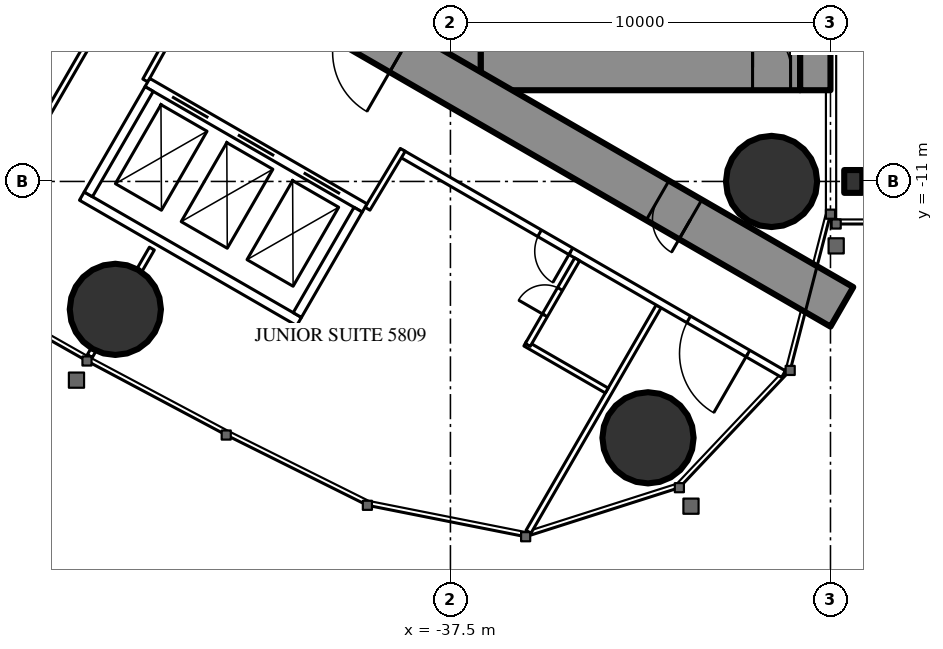
"""IFC4 building model, lengths in metres.
Left out: names, types, materials, properties, quantities, classifications, styles, units other than length and angle.
Written with IfcOpenShell. Run it as: python <this file> out.ifc"""

import sys

from ifc_helpers import new_model, si_unit, direction, frame, frame_2d, origin, origin_2d, place, context, subcontext, project, spatial, rectangle, circle, i_section, extrude, element, fill, save


model = new_model("IFC4")
c1 = context("Model", 3, precision=1e-05, world=origin(), true_north=direction((0.0, 1.0)))
c2 = subcontext(c1, "Body", "Model", "MODEL_VIEW")
j1 = project(units=[si_unit("LENGTHUNIT", "METRE"), si_unit("PLANEANGLEUNIT", "RADIAN")], contexts=[c1])
p1 = place(None, origin())
s1 = spatial("IfcSite", under=j1, at=p1, CompositionType="ELEMENT")
p2 = place(p1, origin())
s2 = spatial("IfcBuilding", under=s1, at=p2, CompositionType="ELEMENT")
p3 = place(p2, frame((0.0, 0.0, 218.9)))
s3 = spatial("IfcBuildingStorey", under=s2, at=p3, CompositionType="ELEMENT", Elevation=218.9)
for number, where, z_axis, x_axis in (
    (1, (-32.301, -17.745, 0.0), (0.0, 0.0, 1.0), (1.0, 0.0, 0.0)),
    (2, (-29.05, -11.0, 0.0), (0.0, 0.0, 1.0), (1.0, 0.0, 0.0)),
    (3, (-46.317, -14.365, 0.0), (0.0, 0.0, 1.0), (1.0, 0.0, 0.0)),
):
    element("IfcColumn", number, at=place(p3, frame(where, z_axis=z_axis, x_axis=x_axis)), inside=s3, PredefinedType="COLUMN", context=c2, shape_type="SweptSolid", body=[
        extrude(circle(Radius=1.2, at=origin_2d()), origin(), (0.0, 0.0, 1.0), 3.6),
    ])
p4 = place(p3, frame((-27.9, 8.6, 0.0), z_axis=(0.0, 0.0, 1.0), x_axis=(0.0, -1.0, 0.0)))
e4 = element("IfcWall", 4, at=p4, inside=s3, PredefinedType="SHEAR", context=c2, shape_type="SweptSolid", body=[
    extrude(rectangle(XDim=17.2, YDim=0.8, at=frame_2d((8.6, 0.0))), origin(), (0.0, 0.0, 1.0), 3.6),
])
p5 = place(p4, frame((6.95, 0.0, 0.0)))
e5 = element("IfcOpeningElement", 5, at=p5, cuts=e4, PredefinedType="OPENING", context=c2, shape_type="SweptSolid", body=[
    extrude(rectangle(XDim=0.9, YDim=2.2, at=frame_2d((0.45, 1.1))), frame((0.0, 0.41, 0.0), z_axis=(0.0, -1.0, 0.0), x_axis=(1.0, 0.0, 0.0)), (0.0, 0.0, 1.0), 0.82),
])
p6 = place(p3, frame((-37.3, 8.6, 0.0), z_axis=(0.0, 0.0, 1.0), x_axis=(0.0, -1.0, 0.0)))
e6 = element("IfcWall", 6, at=p6, inside=s3, PredefinedType="SHEAR", context=c2, shape_type="SweptSolid", body=[
    extrude(rectangle(XDim=17.2, YDim=1.2, at=frame_2d((8.6, 0.0))), origin(), (0.0, 0.0, 1.0), 3.6),
])
p7 = place(p6, frame((7.7, 0.0, 0.0)))
e7 = element("IfcOpeningElement", 7, at=p7, cuts=e6, PredefinedType="OPENING", context=c2, shape_type="SweptSolid", body=[
    extrude(rectangle(XDim=1.8, YDim=2.2, at=frame_2d((0.9, 1.1))), frame((0.0, 0.61, 0.0), z_axis=(0.0, -1.0, 0.0), x_axis=(1.0, 0.0, 0.0)), (0.0, 0.0, 1.0), 1.22),
])
p8 = place(p3, frame((-28.3, -8.0, 0.0), z_axis=(0.0, 0.0, 1.0), x_axis=(-1.0, 0.0, 0.0)))
e8 = element("IfcWall", 8, at=p8, inside=s3, PredefinedType="SHEAR", context=c2, shape_type="SweptSolid", body=[
    extrude(rectangle(XDim=8.4, YDim=1.2, at=frame_2d((4.2, 0.0))), origin(), (0.0, 0.0, 1.0), 3.6),
])
p9 = place(p8, frame((0.25, 0.0, 0.0)))
e9 = element("IfcOpeningElement", 9, at=p9, cuts=e8, PredefinedType="OPENING", context=c2, shape_type="SweptSolid", body=[
    extrude(rectangle(XDim=1.0, YDim=2.2, at=frame_2d((0.5, 1.1))), frame((0.0, 0.61, 0.0), z_axis=(0.0, -1.0, 0.0), x_axis=(1.0, 0.0, 0.0)), (0.0, 0.0, 1.0), 1.22),
])
p10 = place(p3, frame((-27.2, -14.3, 0.0), z_axis=(0.0, 0.0, 1.0), x_axis=(-0.866024021859, 0.500002393557, 0.0)))
e10 = element("IfcWall", 10, at=p10, inside=s3, PredefinedType="SHEAR", context=c2, shape_type="SweptSolid", body=[
    extrude(rectangle(XDim=27.907, YDim=1.2, at=frame_2d((13.954, 0.0))), origin(), (0.0, 0.0, 1.0), 3.6),
])
p11 = place(p10, frame((4.6, 0.0, 0.0)))
e11 = element("IfcOpeningElement", 11, at=p11, cuts=e10, PredefinedType="OPENING", context=c2, shape_type="SweptSolid", body=[
    extrude(rectangle(XDim=1.0, YDim=2.2, at=frame_2d((0.5, 1.1))), frame((0.0, 0.61, 0.0), z_axis=(0.0, -1.0, 0.0), x_axis=(1.0, 0.0, 0.0)), (0.0, 0.0, 1.0), 1.22),
])
p12 = place(p10, frame((13.395, 0.0, 0.0)))
e12 = element("IfcOpeningElement", 12, at=p12, cuts=e10, PredefinedType="OPENING", context=c2, shape_type="SweptSolid", body=[
    extrude(rectangle(XDim=1.8, YDim=2.2, at=frame_2d((0.9, 1.1))), frame((0.0, 0.61, 0.0), z_axis=(0.0, -1.0, 0.0), x_axis=(1.0, 0.0, 0.0)), (0.0, 0.0, 1.0), 1.22),
])
p13 = place(p3, frame((-26.9, -11.0, 0.0), z_axis=(0.0, 0.0, 1.0), x_axis=(1.0, 0.0, 0.0)))
e13 = element("IfcColumn", 13, at=p13, inside=s3, PredefinedType="COLUMN", context=c2, shape_type="SweptSolid", body=[
    extrude(i_section(OverallWidth=0.476, OverallDepth=0.6, WebThickness=0.1, FlangeThickness=0.14, FilletRadius=0.02, at=origin_2d()), origin(), (0.0, 0.0, 1.0), 3.6),
])
p14 = place(p3, frame((-32.022, -14.287, 0.0), z_axis=(0.0, 0.0, 1.0), x_axis=(-0.50000019414, -0.866025291697, 0.0)))
e14 = element("IfcWall", 14, at=p14, inside=s3, PredefinedType="PARTITIONING", context=c2, shape_type="SweptSolid", body=[
    extrude(rectangle(XDim=6.848, YDim=0.15, at=frame_2d((3.424, 0.0))), origin(), (0.0, 0.0, 1.0), 3.35),
])
p15 = place(p3, frame((-46.898, -15.439, 0.0), z_axis=(0.0, 0.0, 1.0), x_axis=(-0.500232303069, -0.865891241997, 0.0)))
e15 = element("IfcWall", 15, at=p15, inside=s3, PredefinedType="PARTITIONING", context=c2, shape_type="SweptSolid", body=[
    extrude(rectangle(XDim=0.18, YDim=0.15, at=frame_2d((0.09, 0.0))), origin(), (0.0, 0.0, 1.0), 2.45),
])
p16 = place(p3, frame((-46.274, -6.059, 0.0), z_axis=(0.0, 0.0, 1.0), x_axis=(-0.500020471368, -0.866013584312, 0.0)))
e16 = element("IfcWall", 16, at=p16, inside=s3, PredefinedType="PARTITIONING", context=c2, shape_type="SweptSolid", body=[
    extrude(rectangle(XDim=6.028, YDim=0.15, at=frame_2d((3.014, 0.0))), origin(), (0.0, 0.0, 1.0), 2.45),
])
p17 = place(p3, frame((-45.356, -12.767, 0.0), z_axis=(0.0, 0.0, 1.0), x_axis=(-0.499886366516, -0.866091000168, 0.0)))
e17 = element("IfcWall", 17, at=p17, inside=s3, PredefinedType="PARTITIONING", context=c2, shape_type="SweptSolid", body=[
    extrude(rectangle(XDim=0.645, YDim=0.15, at=frame_2d((0.322, 0.0))), origin(), (0.0, 0.0, 1.0), 3.35),
])
p18 = place(p3, frame((-28.737, -16.068, 0.0), z_axis=(0.0, 0.0, 1.0), x_axis=(-0.866029399323, 0.49999307946, 0.0)))
e18 = element("IfcWall", 18, at=p18, inside=s3, PredefinedType="PARTITIONING", context=c2, shape_type="SweptSolid", body=[
    extrude(rectangle(XDim=11.61, YDim=0.2, at=frame_2d((5.805, 0.0))), origin(), (0.0, 0.0, 1.0), 3.35),
])
p19 = place(p18, frame((1.08, 0.0, 0.0)))
e19 = element("IfcOpeningElement", 19, at=p19, cuts=e18, PredefinedType="OPENING", context=c2, shape_type="SweptSolid", body=[
    extrude(rectangle(XDim=1.8, YDim=2.03, at=frame_2d((0.9, 1.015))), frame((0.0, 0.11, 0.0), z_axis=(0.0, -1.0, 0.0), x_axis=(1.0, 0.0, 0.0)), (0.0, 0.0, 1.0), 0.22),
])
p20 = place(p18, frame((6.46, 0.0, 0.0)))
e20 = element("IfcOpeningElement", 20, at=p20, cuts=e18, PredefinedType="OPENING", context=c2, shape_type="SweptSolid", body=[
    extrude(rectangle(XDim=0.95, YDim=2.2, at=frame_2d((0.475, 1.1))), frame((0.0, 0.11, 0.0), z_axis=(0.0, -1.0, 0.0), x_axis=(1.0, 0.0, 0.0)), (0.0, 0.0, 1.0), 0.22),
])
for number, where, z_axis, x_axis in (
    (21, (-39.683, -11.718, 0.0), (0.0, 0.0, 1.0), (0.514, 0.858, 0.0)),
    (22, (-44.652, -6.764, 0.0), (0.0, 0.0, 1.0), (-0.485, -0.874, 0.0)),
):
    element("IfcWall", number, at=place(p3, frame(where, z_axis=z_axis, x_axis=x_axis)), inside=s3, PredefinedType="PARTITIONING", context=c2, shape_type="SweptSolid", body=[
        extrude(rectangle(XDim=1.805, YDim=0.15, at=frame_2d((0.903, 0.0))), origin(), (0.0, 0.0, 1.0), 3.35),
    ])
p21 = place(p3, frame((-33.387, -16.502, 0.0), z_axis=(0.0, 0.0, 1.0), x_axis=(-0.866006523861, 0.500032699561, 0.0)))
e23 = element("IfcWall", 23, at=p21, inside=s3, PredefinedType="PARTITIONING", context=c2, shape_type="SweptSolid", body=[
    extrude(rectangle(XDim=2.475, YDim=0.15, at=frame_2d((1.237, 0.0))), origin(), (0.0, 0.0, 1.0), 3.35),
])
p22 = place(p3, frame((-34.165, -13.05, 0.0), z_axis=(0.0, 0.0, 1.0), x_axis=(-0.500047596559, -0.865997922154, 0.0)))
e24 = element("IfcWall", 24, at=p22, inside=s3, PredefinedType="PARTITIONING", context=c2, shape_type="SweptSolid", body=[
    extrude(rectangle(XDim=2.6, YDim=0.15, at=frame_2d((1.3, 0.0))), origin(), (0.0, 0.0, 1.0), 3.35),
])
p23 = place(p22, frame((0.9, 0.0, 0.0)))
e25 = element("IfcOpeningElement", 25, at=p23, cuts=e24, PredefinedType="OPENING", context=c2, shape_type="SweptSolid", body=[
    extrude(rectangle(XDim=0.8, YDim=2.2, at=frame_2d((0.4, 1.1))), frame((0.0, 0.085, 0.0), z_axis=(0.0, -1.0, 0.0), x_axis=(1.0, 0.0, 0.0)), (0.0, 0.0, 1.0), 0.17),
])
p24 = place(p3, frame((-39.758, -11.697, 0.0), z_axis=(0.0, 0.0, 1.0), x_axis=(-0.866024194504, 0.500002094529, 0.0)))
e26 = element("IfcWall", 26, at=p24, inside=s3, PredefinedType="PARTITIONING", context=c2, shape_type="SweptSolid", body=[
    extrude(rectangle(XDim=6.6, YDim=0.25, at=frame_2d((3.3, 0.0))), origin(), (0.0, 0.0, 1.0), 3.35),
])
p25 = place(p24, frame((0.75, 0.0, 0.0)))
e27 = element("IfcOpeningElement", 27, at=p25, cuts=e26, PredefinedType="OPENING", context=c2, shape_type="SweptSolid", body=[
    extrude(rectangle(XDim=1.1, YDim=2.2, at=frame_2d((0.55, 1.1))), frame((0.0, 0.135, 0.0), z_axis=(0.0, -1.0, 0.0), x_axis=(1.0, 0.0, 0.0)), (0.0, 0.0, 1.0), 0.27),
])
p26 = place(p24, frame((2.75, 0.0, 0.0)))
e28 = element("IfcOpeningElement", 28, at=p26, cuts=e26, PredefinedType="OPENING", context=c2, shape_type="SweptSolid", body=[
    extrude(rectangle(XDim=1.1, YDim=2.2, at=frame_2d((0.55, 1.1))), frame((0.0, 0.135, 0.0), z_axis=(0.0, -1.0, 0.0), x_axis=(1.0, 0.0, 0.0)), (0.0, 0.0, 1.0), 0.27),
])
p27 = place(p24, frame((4.75, 0.0, 0.0)))
e29 = element("IfcOpeningElement", 29, at=p27, cuts=e26, PredefinedType="OPENING", context=c2, shape_type="SweptSolid", body=[
    extrude(rectangle(XDim=1.1, YDim=2.2, at=frame_2d((0.55, 1.1))), frame((0.0, 0.135, 0.0), z_axis=(0.0, -1.0, 0.0), x_axis=(1.0, 0.0, 0.0)), (0.0, 0.0, 1.0), 0.27),
])
p28 = place(p3, frame((-41.482, -14.686, 0.0), z_axis=(0.0, 0.0, 1.0), x_axis=(-0.86603344179, 0.499986077507, 0.0)))
e30 = element("IfcWall", 30, at=p28, inside=s3, PredefinedType="PARTITIONING", context=c2, shape_type="SweptSolid", body=[
    extrude(rectangle(XDim=6.6, YDim=0.25, at=frame_2d((3.3, 0.0))), origin(), (0.0, 0.0, 1.0), 3.35),
])
for number, where, z_axis, x_axis in (
    (31, (-39.928, -11.743, 0.0), (0.0, 0.0, 1.0), (-0.5, -0.866, 0.0)),
    (32, (-45.428, -8.568, 0.0), (0.0, 0.0, 1.0), (-0.5, -0.866, 0.0)),
):
    element("IfcWall", number, at=place(p3, frame(where, z_axis=z_axis, x_axis=x_axis)), inside=s3, PredefinedType="PARTITIONING", context=c2, shape_type="SweptSolid", body=[
        extrude(rectangle(XDim=3.201, YDim=0.25, at=frame_2d((1.6, 0.0))), origin(), (0.0, 0.0, 1.0), 3.35),
    ])
p29 = place(p19, origin())
e33 = element("IfcDoor", 33, at=p29, inside=s3, OperationType="DOUBLE_DOOR_SINGLE_SWING", PredefinedType="DOOR", context=c2, shape_type="SweptSolid", body=[
    extrude(rectangle(XDim=1.8, YDim=2.03, at=frame_2d((0.9, 1.015))), frame((0.0, 0.025, 0.0), z_axis=(0.0, -1.0, 0.0), x_axis=(1.0, 0.0, 0.0)), (0.0, 0.0, 1.0), 0.05),
])
fill(e19, e33)
p30 = place(p23, origin())
e34 = element("IfcDoor", 34, at=p30, inside=s3, OperationType="SINGLE_SWING_RIGHT", PredefinedType="DOOR", context=c2, shape_type="SweptSolid", body=[
    extrude(rectangle(XDim=0.8, YDim=2.2, at=frame_2d((0.4, 1.1))), frame((0.0, 0.025, 0.0), z_axis=(0.0, -1.0, 0.0), x_axis=(1.0, 0.0, 0.0)), (0.0, 0.0, 1.0), 0.05),
])
fill(e25, e34)
p31 = place(p20, origin())
e35 = element("IfcDoor", 35, at=p31, inside=s3, OperationType="SINGLE_SWING_LEFT", PredefinedType="DOOR", context=c2, shape_type="SweptSolid", body=[
    extrude(rectangle(XDim=0.95, YDim=2.2, at=frame_2d((0.475, 1.1))), frame((0.0, 0.025, 0.0), z_axis=(0.0, -1.0, 0.0), x_axis=(1.0, 0.0, 0.0)), (0.0, 0.0, 1.0), 0.05),
])
fill(e20, e35)
p32 = place(p11, origin())
e36 = element("IfcDoor", 36, at=p32, inside=s3, OperationType="SINGLE_SWING_LEFT", PredefinedType="DOOR", context=c2, shape_type="SweptSolid", body=[
    extrude(rectangle(XDim=1.0, YDim=2.2, at=frame_2d((0.5, 1.1))), frame((0.0, 0.025, 0.0), z_axis=(0.0, -1.0, 0.0), x_axis=(1.0, 0.0, 0.0)), (0.0, 0.0, 1.0), 0.05),
])
fill(e11, e36)
p33 = place(p12, origin())
e37 = element("IfcDoor", 37, at=p33, inside=s3, OperationType="DOUBLE_DOOR_SINGLE_SWING", PredefinedType="DOOR", context=c2, shape_type="SweptSolid", body=[
    extrude(rectangle(XDim=1.8, YDim=2.2, at=frame_2d((0.9, 1.1))), frame((0.0, 0.025, 0.0), z_axis=(0.0, -1.0, 0.0), x_axis=(1.0, 0.0, 0.0)), (0.0, 0.0, 1.0), 0.05),
])
fill(e12, e37)
p34 = place(p9, origin())
e38 = element("IfcDoor", 38, at=p34, inside=s3, OperationType="SINGLE_SWING_RIGHT", PredefinedType="DOOR", context=c2, shape_type="SweptSolid", body=[
    extrude(rectangle(XDim=1.0, YDim=2.2, at=frame_2d((0.5, 1.1))), frame((0.0, 0.025, 0.0), z_axis=(0.0, -1.0, 0.0), x_axis=(1.0, 0.0, 0.0)), (0.0, 0.0, 1.0), 0.05),
])
fill(e9, e38)
p35 = place(p25, origin())
e39 = element("IfcDoor", 39, at=p35, inside=s3, OperationType="DOUBLE_DOOR_SLIDING", PredefinedType="USERDEFINED", context=c2, shape_type="SweptSolid", body=[
    extrude(rectangle(XDim=1.1, YDim=2.2, at=frame_2d((0.55, 1.1))), frame((0.0, 0.025, 0.0), z_axis=(0.0, -1.0, 0.0), x_axis=(1.0, 0.0, 0.0)), (0.0, 0.0, 1.0), 0.05),
])
fill(e27, e39)
p36 = place(p26, origin())
e40 = element("IfcDoor", 40, at=p36, inside=s3, OperationType="DOUBLE_DOOR_SLIDING", PredefinedType="USERDEFINED", context=c2, shape_type="SweptSolid", body=[
    extrude(rectangle(XDim=1.1, YDim=2.2, at=frame_2d((0.55, 1.1))), frame((0.0, 0.025, 0.0), z_axis=(0.0, -1.0, 0.0), x_axis=(1.0, 0.0, 0.0)), (0.0, 0.0, 1.0), 0.05),
])
fill(e28, e40)
p37 = place(p27, origin())
e41 = element("IfcDoor", 41, at=p37, inside=s3, OperationType="DOUBLE_DOOR_SLIDING", PredefinedType="USERDEFINED", context=c2, shape_type="SweptSolid", body=[
    extrude(rectangle(XDim=1.1, YDim=2.2, at=frame_2d((0.55, 1.1))), frame((0.0, 0.025, 0.0), z_axis=(0.0, -1.0, 0.0), x_axis=(1.0, 0.0, 0.0)), (0.0, 0.0, 1.0), 0.05),
])
fill(e29, e41)
save(model, sys.argv[1])
